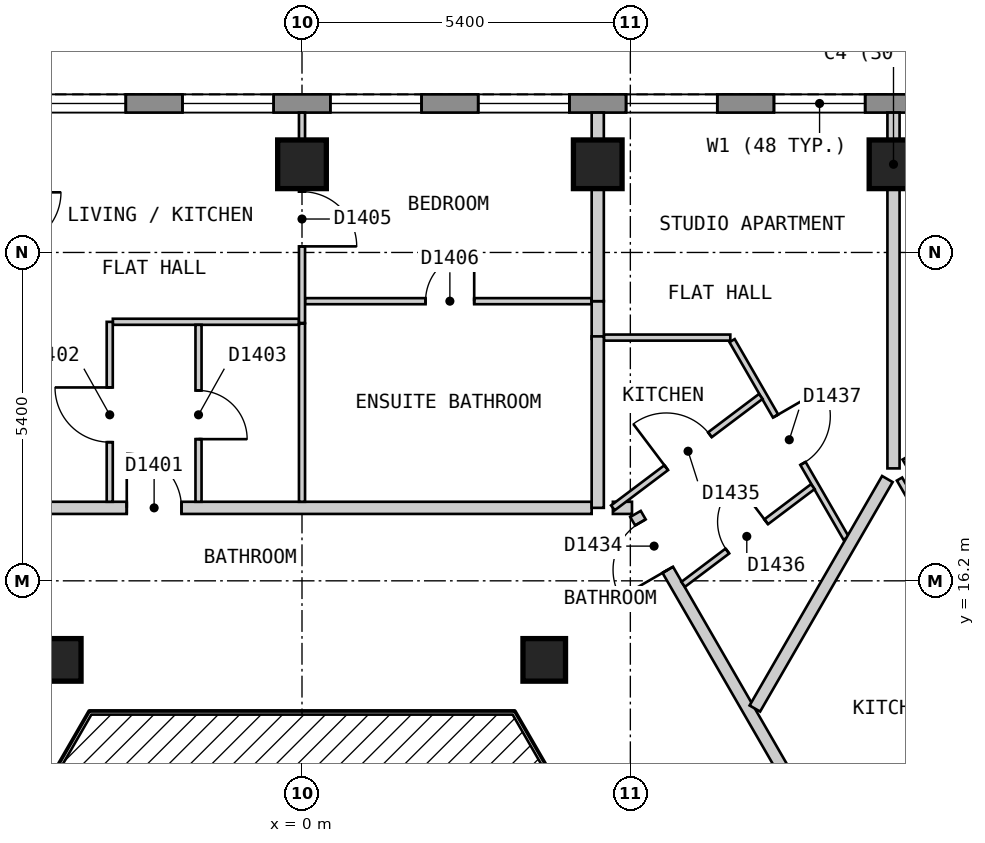
"""IFC4 building model, lengths in metres.
Left out: names, types, materials, properties, quantities, classifications, styles, units other than length and angle.
Written with IfcOpenShell. Run it as: python <this file> out.ifc"""

import sys

from ifc_helpers import new_model, si_unit, direction, frame, frame_2d, origin, origin_2d, place, context, subcontext, project, spatial, polyline, rectangle, outline, extrude, element, fill, save


model = new_model("IFC4")
c1 = context("Model", 3, precision=1e-05, world=origin(), true_north=direction((0.0, 1.0)))
c2 = subcontext(c1, "Body", "Model", "MODEL_VIEW")
j1 = project(units=[si_unit("LENGTHUNIT", "METRE"), si_unit("PLANEANGLEUNIT", "RADIAN")], contexts=[c1])
p1 = place(None, origin())
s1 = spatial("IfcSite", under=j1, at=p1, CompositionType="ELEMENT")
p2 = place(p1, origin())
s2 = spatial("IfcBuilding", under=s1, at=p2, CompositionType="ELEMENT")
p3 = place(p2, frame((0.0, 0.0, 166.2)))
s3 = spatial("IfcBuildingStorey", under=s2, at=p3, CompositionType="ELEMENT", Elevation=166.2)
for number, where, z_axis, x_axis in (
    (1, (9.728, 23.05, 0.0), (0.0, 0.0, 1.0), (-1.0, 0.0, 0.0)),
    (2, (4.864, 23.05, 0.0), (0.0, 0.0, 1.0), (-1.0, 0.0, 0.0)),
    (3, (0.0, 23.05, 0.0), (0.0, 0.0, 1.0), (-1.0, 0.0, 0.0)),
):
    element("IfcColumn", number, at=place(p3, frame(where, z_axis=z_axis, x_axis=x_axis)), inside=s3, PredefinedType="COLUMN", context=c2, shape_type="SweptSolid", body=[
        extrude(rectangle(XDim=0.8, YDim=0.8, at=origin_2d()), origin(), (0.0, 0.0, 1.0), 3.0),
    ])
for number, where, z_axis, x_axis in (
    (4, (3.984, 14.9, 0.0), (0.0, 0.0, 1.0), (1.0, 0.0, 0.0)),
    (5, (-3.984, 14.9, 0.0), (0.0, 0.0, 1.0), (1.0, 0.0, 0.0)),
):
    element("IfcColumn", number, at=place(p3, frame(where, z_axis=z_axis, x_axis=x_axis)), inside=s3, PredefinedType="COLUMN", context=c2, shape_type="SweptSolid", body=[
        extrude(rectangle(XDim=0.7, YDim=0.7, at=origin_2d()), origin(), (0.0, 0.0, 1.0), 3.0),
    ])
p4 = place(p3, frame((10.392, 24.05, 0.0), z_axis=(0.0, 0.0, 1.0), x_axis=(-1.0, 0.0, 0.0)))
e6 = element("IfcWall", 6, at=p4, inside=s3, PredefinedType="SOLIDWALL", context=c2, shape_type="SweptSolid", body=[
    extrude(outline(polyline([(0.0, -0.15), (20.784, -0.15), (20.704, 0.15), (0.08, 0.15), (0.0, -0.15)])), origin(), (0.0, 0.0, 1.0), 2.7),
])
p5 = place(p4, frame((1.13, 0.0, 0.15)))
e7 = element("IfcOpeningElement", 7, at=p5, cuts=e6, PredefinedType="OPENING", context=c2, shape_type="SweptSolid", body=[
    extrude(rectangle(XDim=1.5, YDim=2.1, at=frame_2d((0.75, 1.05))), frame((0.0, 0.16, 0.0), z_axis=(0.0, -1.0, 0.0), x_axis=(1.0, 0.0, 0.0)), (0.0, 0.0, 1.0), 0.32),
])
p6 = place(p4, frame((3.562, 0.0, 0.15)))
e8 = element("IfcOpeningElement", 8, at=p6, cuts=e6, PredefinedType="OPENING", context=c2, shape_type="SweptSolid", body=[
    extrude(rectangle(XDim=1.5, YDim=2.1, at=frame_2d((0.75, 1.05))), frame((0.0, 0.16, 0.0), z_axis=(0.0, -1.0, 0.0), x_axis=(1.0, 0.0, 0.0)), (0.0, 0.0, 1.0), 0.32),
])
p7 = place(p4, frame((5.994, 0.0, 0.15)))
e9 = element("IfcOpeningElement", 9, at=p7, cuts=e6, PredefinedType="OPENING", context=c2, shape_type="SweptSolid", body=[
    extrude(rectangle(XDim=1.5, YDim=2.1, at=frame_2d((0.75, 1.05))), frame((0.0, 0.16, 0.0), z_axis=(0.0, -1.0, 0.0), x_axis=(1.0, 0.0, 0.0)), (0.0, 0.0, 1.0), 0.32),
])
p8 = place(p4, frame((8.426, 0.0, 0.15)))
e10 = element("IfcOpeningElement", 10, at=p8, cuts=e6, PredefinedType="OPENING", context=c2, shape_type="SweptSolid", body=[
    extrude(rectangle(XDim=1.5, YDim=2.1, at=frame_2d((0.75, 1.05))), frame((0.0, 0.16, 0.0), z_axis=(0.0, -1.0, 0.0), x_axis=(1.0, 0.0, 0.0)), (0.0, 0.0, 1.0), 0.32),
])
p9 = place(p4, frame((10.858, 0.0, 0.15)))
e11 = element("IfcOpeningElement", 11, at=p9, cuts=e6, PredefinedType="OPENING", context=c2, shape_type="SweptSolid", body=[
    extrude(rectangle(XDim=1.5, YDim=2.1, at=frame_2d((0.75, 1.05))), frame((0.0, 0.16, 0.0), z_axis=(0.0, -1.0, 0.0), x_axis=(1.0, 0.0, 0.0)), (0.0, 0.0, 1.0), 0.32),
])
p10 = place(p4, frame((13.29, 0.0, 0.15)))
e12 = element("IfcOpeningElement", 12, at=p10, cuts=e6, PredefinedType="OPENING", context=c2, shape_type="SweptSolid", body=[
    extrude(rectangle(XDim=1.5, YDim=2.1, at=frame_2d((0.75, 1.05))), frame((0.0, 0.16, 0.0), z_axis=(0.0, -1.0, 0.0), x_axis=(1.0, 0.0, 0.0)), (0.0, 0.0, 1.0), 0.32),
])
p11 = place(p4, frame((15.722, 0.0, 0.15)))
e13 = element("IfcOpeningElement", 13, at=p11, cuts=e6, PredefinedType="OPENING", context=c2, shape_type="SweptSolid", body=[
    extrude(rectangle(XDim=1.5, YDim=2.1, at=frame_2d((0.75, 1.05))), frame((0.0, 0.16, 0.0), z_axis=(0.0, -1.0, 0.0), x_axis=(1.0, 0.0, 0.0)), (0.0, 0.0, 1.0), 0.32),
])
p12 = place(p4, frame((18.154, 0.0, 0.15)))
e14 = element("IfcOpeningElement", 14, at=p12, cuts=e6, PredefinedType="OPENING", context=c2, shape_type="SweptSolid", body=[
    extrude(rectangle(XDim=1.5, YDim=2.1, at=frame_2d((0.75, 1.05))), frame((0.0, 0.16, 0.0), z_axis=(0.0, -1.0, 0.0), x_axis=(1.0, 0.0, 0.0)), (0.0, 0.0, 1.0), 0.32),
])
p13 = place(p3, frame((5.485, 17.3, 0.0), z_axis=(0.0, 0.0, 1.0), x_axis=(0.499965832213, -0.866045129667, 0.0)))
e15 = element("IfcWall", 15, at=p13, inside=s3, PredefinedType="PARTITIONING", context=c2, shape_type="SweptSolid", body=[
    extrude(rectangle(XDim=10.739, YDim=0.2, at=frame_2d((5.369, 0.0))), origin(), (0.0, 0.0, 1.0), 2.7),
])
p14 = place(p13, frame((9.048, 0.0, 0.0)))
e16 = element("IfcOpeningElement", 16, at=p14, cuts=e15, PredefinedType="OPENING", context=c2, shape_type="SweptSolid", body=[
    extrude(rectangle(XDim=1.0, YDim=2.1, at=frame_2d((0.5, 1.05))), frame((0.0, 0.11, 0.0), z_axis=(0.0, -1.0, 0.0), x_axis=(1.0, 0.0, 0.0)), (0.0, 0.0, 1.0), 0.22),
])
p15 = place(p13, frame((0.161, 0.0, 0.0)))
e17 = element("IfcOpeningElement", 17, at=p15, cuts=e15, PredefinedType="OPENING", context=c2, shape_type="SweptSolid", body=[
    extrude(rectangle(XDim=0.9, YDim=2.1, at=frame_2d((0.45, 1.05))), frame((0.0, 0.11, 0.0), z_axis=(0.0, -1.0, 0.0), x_axis=(1.0, 0.0, 0.0)), (0.0, 0.0, 1.0), 0.22),
])
p16 = place(p3, frame((-5.311, 17.4, 0.0), z_axis=(0.0, 0.0, 1.0), x_axis=(1.0, 0.0, 0.0)))
e18 = element("IfcWall", 18, at=p16, inside=s3, PredefinedType="PARTITIONING", context=c2, shape_type="SweptSolid", body=[
    extrude(rectangle(XDim=10.075, YDim=0.2, at=frame_2d((5.038, 0.0))), origin(), (0.0, 0.0, 1.0), 2.7),
])
p17 = place(p16, frame((2.429, 0.0, 0.0)))
e19 = element("IfcOpeningElement", 19, at=p17, cuts=e18, PredefinedType="OPENING", context=c2, shape_type="SweptSolid", body=[
    extrude(rectangle(XDim=0.9, YDim=2.1, at=frame_2d((0.45, 1.05))), frame((0.0, 0.11, 0.0), z_axis=(0.0, -1.0, 0.0), x_axis=(1.0, 0.0, 0.0)), (0.0, 0.0, 1.0), 0.22),
])
p18 = place(p3, frame((5.113, 17.4, 0.0), z_axis=(0.0, 0.0, 1.0), x_axis=(1.0, 0.0, 0.0)))
e20 = element("IfcWall", 20, at=p18, inside=s3, PredefinedType="PARTITIONING", context=c2, shape_type="SweptSolid", body=[
    extrude(rectangle(XDim=0.314, YDim=0.2, at=frame_2d((0.157, 0.0))), origin(), (0.0, 0.0, 1.0), 2.7),
])
p19 = place(p3, frame((7.073, 20.15, 0.0), z_axis=(0.0, 0.0, 1.0), x_axis=(0.499917691695, -0.866072919292, 0.0)))
e21 = element("IfcWall", 21, at=p19, inside=s3, PredefinedType="PARTITIONING", context=c2, shape_type="SweptSolid", body=[
    extrude(rectangle(XDim=3.753, YDim=0.1, at=frame_2d((1.876, 0.0))), origin(), (0.0, 0.0, 1.0), 2.7),
])
p20 = place(p19, frame((1.432, 0.0, 0.0)))
e22 = element("IfcOpeningElement", 22, at=p20, cuts=e21, PredefinedType="OPENING", context=c2, shape_type="SweptSolid", body=[
    extrude(rectangle(XDim=0.9, YDim=2.1, at=frame_2d((0.45, 1.05))), frame((0.0, 0.06, 0.0), z_axis=(0.0, -1.0, 0.0), x_axis=(1.0, 0.0, 0.0)), (0.0, 0.0, 1.0), 0.12),
])
p21 = place(p3, frame((9.827, 17.874, 0.0), z_axis=(0.0, 0.0, 1.0), x_axis=(0.499962189394, -0.866047232647, 0.0)))
e23 = element("IfcWall", 23, at=p21, inside=s3, PredefinedType="PARTITIONING", context=c2, shape_type="SweptSolid", body=[
    extrude(rectangle(XDim=11.401, YDim=0.1, at=frame_2d((5.701, 0.0))), origin(), (0.0, 0.0, 1.0), 2.7),
])
p22 = place(p21, frame((7.433, 0.0, 0.0)))
e24 = element("IfcOpeningElement", 24, at=p22, cuts=e23, PredefinedType="OPENING", context=c2, shape_type="SweptSolid", body=[
    extrude(rectangle(XDim=0.9, YDim=2.1, at=frame_2d((0.45, 1.05))), frame((0.0, 0.06, 0.0), z_axis=(0.0, -1.0, 0.0), x_axis=(1.0, 0.0, 0.0)), (0.0, 0.0, 1.0), 0.12),
])
p23 = place(p3, frame((0.0, 20.43, 0.0), z_axis=(0.0, 0.0, 1.0), x_axis=(0.0, -1.0, 0.0)))
e25 = element("IfcWall", 25, at=p23, inside=s3, PredefinedType="PARTITIONING", context=c2, shape_type="SweptSolid", body=[
    extrude(rectangle(XDim=2.93, YDim=0.1, at=frame_2d((1.465, 0.0))), origin(), (0.0, 0.0, 1.0), 2.7),
])
p24 = place(p3, frame((4.964, 20.2, 0.0), z_axis=(0.0, 0.0, 1.0), x_axis=(1.0, 0.0, 0.0)))
e26 = element("IfcWall", 26, at=p24, inside=s3, PredefinedType="PARTITIONING", context=c2, shape_type="SweptSolid", body=[
    extrude(rectangle(XDim=2.08, YDim=0.1, at=frame_2d((1.04, 0.0))), origin(), (0.0, 0.0, 1.0), 2.7),
])
p25 = place(p3, frame((-3.111, 20.46, 0.0), z_axis=(0.0, 0.0, 1.0), x_axis=(1.0, 0.0, 0.0)))
e27 = element("IfcWall", 27, at=p25, inside=s3, PredefinedType="PARTITIONING", context=c2, shape_type="SweptSolid", body=[
    extrude(rectangle(XDim=3.061, YDim=0.1, at=frame_2d((1.531, 0.0))), origin(), (0.0, 0.0, 1.0), 2.7),
])
p26 = place(p3, frame((0.05, 20.799, 0.0), z_axis=(0.0, 0.0, 1.0), x_axis=(1.0, 0.0, 0.0)))
e28 = element("IfcWall", 28, at=p26, inside=s3, PredefinedType="PARTITIONING", context=c2, shape_type="SweptSolid", body=[
    extrude(rectangle(XDim=4.714, YDim=0.1, at=frame_2d((2.357, 0.0))), origin(), (0.0, 0.0, 1.0), 2.7),
])
p27 = place(p26, frame((1.982, 0.0, 0.0)))
e29 = element("IfcOpeningElement", 29, at=p27, cuts=e28, PredefinedType="OPENING", context=c2, shape_type="SweptSolid", body=[
    extrude(rectangle(XDim=0.8, YDim=2.1, at=frame_2d((0.4, 1.05))), frame((0.0, 0.06, 0.0), z_axis=(0.0, -1.0, 0.0), x_axis=(1.0, 0.0, 0.0)), (0.0, 0.0, 1.0), 0.12),
])
p28 = place(p3, frame((0.0, 20.44, 0.0), z_axis=(0.0, 0.0, 1.0), x_axis=(0.0, 1.0, 0.0)))
e30 = element("IfcWall", 30, at=p28, inside=s3, PredefinedType="PARTITIONING", context=c2, shape_type="SweptSolid", body=[
    extrude(rectangle(XDim=3.46, YDim=0.1, at=frame_2d((1.73, 0.0))), origin(), (0.0, 0.0, 1.0), 2.7),
])
p29 = place(p28, frame((1.26, 0.0, 0.0)))
e31 = element("IfcOpeningElement", 31, at=p29, cuts=e30, PredefinedType="OPENING", context=c2, shape_type="SweptSolid", body=[
    extrude(rectangle(XDim=0.9, YDim=2.1, at=frame_2d((0.45, 1.05))), frame((0.0, 0.06, 0.0), z_axis=(0.0, -1.0, 0.0), x_axis=(1.0, 0.0, 0.0)), (0.0, 0.0, 1.0), 0.12),
])
p30 = place(p3, frame((-3.162, 17.5, 0.0), z_axis=(0.0, 0.0, 1.0), x_axis=(0.0, 1.0, 0.0)))
e32 = element("IfcWall", 32, at=p30, inside=s3, PredefinedType="PARTITIONING", context=c2, shape_type="SweptSolid", body=[
    extrude(rectangle(XDim=2.959, YDim=0.1, at=frame_2d((1.479, 0.0))), origin(), (0.0, 0.0, 1.0), 2.7),
])
p31 = place(p30, frame((0.98, 0.0, 0.0)))
e33 = element("IfcOpeningElement", 33, at=p31, cuts=e32, PredefinedType="OPENING", context=c2, shape_type="SweptSolid", body=[
    extrude(rectangle(XDim=0.9, YDim=2.1, at=frame_2d((0.45, 1.05))), frame((0.0, 0.06, 0.0), z_axis=(0.0, -1.0, 0.0), x_axis=(1.0, 0.0, 0.0)), (0.0, 0.0, 1.0), 0.12),
])
p32 = place(p3, frame((-1.702, 17.5, 0.0), z_axis=(0.0, 0.0, 1.0), x_axis=(0.0, 1.0, 0.0)))
e34 = element("IfcWall", 34, at=p32, inside=s3, PredefinedType="PARTITIONING", context=c2, shape_type="SweptSolid", body=[
    extrude(rectangle(XDim=2.91, YDim=0.1, at=frame_2d((1.455, 0.0))), origin(), (0.0, 0.0, 1.0), 2.7),
])
p33 = place(p32, frame((1.03, 0.0, 0.0)))
e35 = element("IfcOpeningElement", 35, at=p33, cuts=e34, PredefinedType="OPENING", context=c2, shape_type="SweptSolid", body=[
    extrude(rectangle(XDim=0.8, YDim=2.1, at=frame_2d((0.4, 1.05))), frame((0.0, 0.06, 0.0), z_axis=(0.0, -1.0, 0.0), x_axis=(1.0, 0.0, 0.0)), (0.0, 0.0, 1.0), 0.12),
])
p34 = place(p3, frame((8.999, 11.413, 0.0), z_axis=(0.0, 0.0, 1.0), x_axis=(0.865969252911, 0.500097243556, 0.0)))
e36 = element("IfcWall", 36, at=p34, inside=s3, PredefinedType="PARTITIONING", context=c2, shape_type="SweptSolid", body=[
    extrude(rectangle(XDim=3.947, YDim=0.1, at=frame_2d((1.974, 0.0))), origin(), (0.0, 0.0, 1.0), 2.7),
])
p35 = place(p34, frame((1.474, 0.0, 0.0)))
e37 = element("IfcOpeningElement", 37, at=p35, cuts=e36, PredefinedType="OPENING", context=c2, shape_type="SweptSolid", body=[
    extrude(rectangle(XDim=0.9, YDim=2.1, at=frame_2d((0.45, 1.05))), frame((0.0, 0.06, 0.0), z_axis=(0.0, -1.0, 0.0), x_axis=(1.0, 0.0, 0.0)), (0.0, 0.0, 1.0), 0.12),
])
p36 = place(p3, frame((9.902, 18.151, 0.0), z_axis=(0.0, 0.0, 1.0), x_axis=(0.866032278734, 0.499988092049, 0.0)))
e38 = element("IfcWall", 38, at=p36, inside=s3, PredefinedType="PARTITIONING", context=c2, shape_type="SweptSolid", body=[
    extrude(rectangle(XDim=5.649, YDim=0.1, at=frame_2d((2.824, 0.0))), origin(), (0.0, 0.0, 1.0), 2.7),
])
p37 = place(p36, frame((2.274, 0.0, 0.0)))
e39 = element("IfcOpeningElement", 39, at=p37, cuts=e38, PredefinedType="OPENING", context=c2, shape_type="SweptSolid", body=[
    extrude(rectangle(XDim=0.9, YDim=2.1, at=frame_2d((0.45, 1.05))), frame((0.0, 0.06, 0.0), z_axis=(0.0, -1.0, 0.0), x_axis=(1.0, 0.0, 0.0)), (0.0, 0.0, 1.0), 0.12),
])
p38 = place(p3, frame((6.269, 16.142, 0.0), z_axis=(0.0, 0.0, 1.0), x_axis=(0.798549086509, 0.601929693931, 0.0)))
e40 = element("IfcWall", 40, at=p38, inside=s3, PredefinedType="PARTITIONING", context=c2, shape_type="SweptSolid", body=[
    extrude(rectangle(XDim=2.67, YDim=0.1, at=frame_2d((1.335, 0.0))), origin(), (0.0, 0.0, 1.0), 2.7),
])
p39 = place(p38, frame((0.91, 0.0, 0.0)))
e41 = element("IfcOpeningElement", 41, at=p39, cuts=e40, PredefinedType="OPENING", context=c2, shape_type="SweptSolid", body=[
    extrude(rectangle(XDim=0.8, YDim=2.1, at=frame_2d((0.4, 1.05))), frame((0.0, 0.06, 0.0), z_axis=(0.0, -1.0, 0.0), x_axis=(1.0, 0.0, 0.0)), (0.0, 0.0, 1.0), 0.12),
])
p40 = place(p3, frame((5.113, 17.4, 0.0), z_axis=(0.0, 0.0, 1.0), x_axis=(0.798718434647, 0.601704962714, 0.0)))
e42 = element("IfcWall", 42, at=p40, inside=s3, PredefinedType="PARTITIONING", context=c2, shape_type="SweptSolid", body=[
    extrude(rectangle(XDim=3.045, YDim=0.1, at=frame_2d((1.522, 0.0))), origin(), (0.0, 0.0, 1.0), 2.7),
])
p41 = place(p40, frame((1.098, 0.0, 0.0)))
e43 = element("IfcOpeningElement", 43, at=p41, cuts=e42, PredefinedType="OPENING", context=c2, shape_type="SweptSolid", body=[
    extrude(rectangle(XDim=0.9, YDim=2.1, at=frame_2d((0.45, 1.05))), frame((0.0, 0.06, 0.0), z_axis=(0.0, -1.0, 0.0), x_axis=(1.0, 0.0, 0.0)), (0.0, 0.0, 1.0), 0.12),
])
p42 = place(p3, frame((4.864, 20.799, 0.0), z_axis=(0.0, 0.0, 1.0), x_axis=(0.0, -1.0, 0.0)))
e44 = element("IfcWall", 44, at=p42, inside=s3, PredefinedType="PARTITIONING", context=c2, shape_type="SweptSolid", body=[
    extrude(rectangle(XDim=0.619, YDim=0.2, at=frame_2d((0.31, 0.0))), origin(), (0.0, 0.0, 1.0), 2.7),
])
p43 = place(p3, frame((7.448, 14.1, 0.0), z_axis=(0.0, 0.0, 1.0), x_axis=(0.500013426303, 0.866017651966, 0.0)))
e45 = element("IfcWall", 45, at=p43, inside=s3, PredefinedType="PARTITIONING", context=c2, shape_type="SweptSolid", body=[
    extrude(rectangle(XDim=4.358, YDim=0.2, at=frame_2d((2.179, 0.0))), origin(), (0.0, 0.0, 1.0), 2.7),
])
p44 = place(p3, frame((4.864, 17.4, 0.0), z_axis=(0.0, 0.0, 1.0), x_axis=(0.0, 1.0, 0.0)))
e46 = element("IfcWall", 46, at=p44, inside=s3, PredefinedType="PARTITIONING", context=c2, shape_type="SweptSolid", body=[
    extrude(rectangle(XDim=2.82, YDim=0.2, at=frame_2d((1.41, 0.0))), origin(), (0.0, 0.0, 1.0), 2.7),
])
p45 = place(p3, frame((4.864, 20.799, 0.0), z_axis=(0.0, 0.0, 1.0), x_axis=(0.0, 1.0, 0.0)))
e47 = element("IfcWall", 47, at=p45, inside=s3, PredefinedType="PARTITIONING", context=c2, shape_type="SweptSolid", body=[
    extrude(rectangle(XDim=3.101, YDim=0.2, at=frame_2d((1.55, 0.0))), origin(), (0.0, 0.0, 1.0), 2.7),
])
p46 = place(p3, frame((9.728, 18.049, 0.0), z_axis=(0.0, 0.0, 1.0), x_axis=(0.0, 1.0, 0.0)))
e48 = element("IfcWall", 48, at=p46, inside=s3, PredefinedType="PARTITIONING", context=c2, shape_type="SweptSolid", body=[
    extrude(rectangle(XDim=5.851, YDim=0.2, at=frame_2d((2.925, 0.0))), origin(), (0.0, 0.0, 1.0), 2.7),
])
p47 = place(p5, origin())
e49 = element("IfcWindow", 49, at=p47, inside=s3, PartitioningType="SINGLE_PANEL", PredefinedType="WINDOW", context=c2, shape_type="SweptSolid", body=[
    extrude(rectangle(XDim=1.5, YDim=2.1, at=frame_2d((0.75, 1.05))), frame((0.0, 0.03, 0.0), z_axis=(0.0, -1.0, 0.0), x_axis=(1.0, 0.0, 0.0)), (0.0, 0.0, 1.0), 0.06),
])
fill(e7, e49)
p48 = place(p6, origin())
e50 = element("IfcWindow", 50, at=p48, inside=s3, PartitioningType="SINGLE_PANEL", PredefinedType="WINDOW", context=c2, shape_type="SweptSolid", body=[
    extrude(rectangle(XDim=1.5, YDim=2.1, at=frame_2d((0.75, 1.05))), frame((0.0, 0.03, 0.0), z_axis=(0.0, -1.0, 0.0), x_axis=(1.0, 0.0, 0.0)), (0.0, 0.0, 1.0), 0.06),
])
fill(e8, e50)
p49 = place(p7, origin())
e51 = element("IfcWindow", 51, at=p49, inside=s3, PartitioningType="SINGLE_PANEL", PredefinedType="WINDOW", context=c2, shape_type="SweptSolid", body=[
    extrude(rectangle(XDim=1.5, YDim=2.1, at=frame_2d((0.75, 1.05))), frame((0.0, 0.03, 0.0), z_axis=(0.0, -1.0, 0.0), x_axis=(1.0, 0.0, 0.0)), (0.0, 0.0, 1.0), 0.06),
])
fill(e9, e51)
p50 = place(p8, origin())
e52 = element("IfcWindow", 52, at=p50, inside=s3, PartitioningType="SINGLE_PANEL", PredefinedType="WINDOW", context=c2, shape_type="SweptSolid", body=[
    extrude(rectangle(XDim=1.5, YDim=2.1, at=frame_2d((0.75, 1.05))), frame((0.0, 0.03, 0.0), z_axis=(0.0, -1.0, 0.0), x_axis=(1.0, 0.0, 0.0)), (0.0, 0.0, 1.0), 0.06),
])
fill(e10, e52)
p51 = place(p9, origin())
e53 = element("IfcWindow", 53, at=p51, inside=s3, PartitioningType="SINGLE_PANEL", PredefinedType="WINDOW", context=c2, shape_type="SweptSolid", body=[
    extrude(rectangle(XDim=1.5, YDim=2.1, at=frame_2d((0.75, 1.05))), frame((0.0, 0.03, 0.0), z_axis=(0.0, -1.0, 0.0), x_axis=(1.0, 0.0, 0.0)), (0.0, 0.0, 1.0), 0.06),
])
fill(e11, e53)
p52 = place(p10, origin())
e54 = element("IfcWindow", 54, at=p52, inside=s3, PartitioningType="SINGLE_PANEL", PredefinedType="WINDOW", context=c2, shape_type="SweptSolid", body=[
    extrude(rectangle(XDim=1.5, YDim=2.1, at=frame_2d((0.75, 1.05))), frame((0.0, 0.03, 0.0), z_axis=(0.0, -1.0, 0.0), x_axis=(1.0, 0.0, 0.0)), (0.0, 0.0, 1.0), 0.06),
])
fill(e12, e54)
p53 = place(p17, origin())
e55 = element("IfcDoor", 55, at=p53, inside=s3, OperationType="SINGLE_SWING_LEFT", PredefinedType="DOOR", context=c2, shape_type="SweptSolid", body=[
    extrude(rectangle(XDim=0.9, YDim=2.1, at=frame_2d((0.45, 1.05))), frame((0.0, 0.025, 0.0), z_axis=(0.0, -1.0, 0.0), x_axis=(1.0, 0.0, 0.0)), (0.0, 0.0, 1.0), 0.05),
])
fill(e19, e55)
p54 = place(p31, origin())
e56 = element("IfcDoor", 56, at=p54, inside=s3, OperationType="SINGLE_SWING_RIGHT", PredefinedType="DOOR", context=c2, shape_type="SweptSolid", body=[
    extrude(rectangle(XDim=0.9, YDim=2.1, at=frame_2d((0.45, 1.05))), frame((0.0, 0.025, 0.0), z_axis=(0.0, -1.0, 0.0), x_axis=(1.0, 0.0, 0.0)), (0.0, 0.0, 1.0), 0.05),
])
fill(e33, e56)
p55 = place(p33, origin())
e57 = element("IfcDoor", 57, at=p55, inside=s3, OperationType="SINGLE_SWING_LEFT", PredefinedType="DOOR", context=c2, shape_type="SweptSolid", body=[
    extrude(rectangle(XDim=0.8, YDim=2.1, at=frame_2d((0.4, 1.05))), frame((0.0, 0.025, 0.0), z_axis=(0.0, -1.0, 0.0), x_axis=(1.0, 0.0, 0.0)), (0.0, 0.0, 1.0), 0.05),
])
fill(e35, e57)
p56 = place(p29, origin())
e58 = element("IfcDoor", 58, at=p56, inside=s3, OperationType="SINGLE_SWING_LEFT", PredefinedType="DOOR", context=c2, shape_type="SweptSolid", body=[
    extrude(rectangle(XDim=0.9, YDim=2.1, at=frame_2d((0.45, 1.05))), frame((0.0, 0.025, 0.0), z_axis=(0.0, -1.0, 0.0), x_axis=(1.0, 0.0, 0.0)), (0.0, 0.0, 1.0), 0.05),
])
fill(e31, e58)
p57 = place(p27, origin())
e59 = element("IfcDoor", 59, at=p57, inside=s3, OperationType="SINGLE_SWING_RIGHT", PredefinedType="DOOR", context=c2, shape_type="SweptSolid", body=[
    extrude(rectangle(XDim=0.8, YDim=2.1, at=frame_2d((0.4, 1.05))), frame((0.0, 0.025, 0.0), z_axis=(0.0, -1.0, 0.0), x_axis=(1.0, 0.0, 0.0)), (0.0, 0.0, 1.0), 0.05),
])
fill(e29, e59)
p58 = place(p15, origin())
e60 = element("IfcDoor", 60, at=p58, inside=s3, OperationType="SINGLE_SWING_RIGHT", PredefinedType="DOOR", context=c2, shape_type="SweptSolid", body=[
    extrude(rectangle(XDim=0.9, YDim=2.1, at=frame_2d((0.45, 1.05))), frame((0.0, 0.025, 0.0), z_axis=(0.0, -1.0, 0.0), x_axis=(1.0, 0.0, 0.0)), (0.0, 0.0, 1.0), 0.05),
])
fill(e17, e60)
p59 = place(p41, origin())
e61 = element("IfcDoor", 61, at=p59, inside=s3, OperationType="SINGLE_SWING_LEFT", PredefinedType="DOOR", context=c2, shape_type="SweptSolid", body=[
    extrude(rectangle(XDim=0.9, YDim=2.1, at=frame_2d((0.45, 1.05))), frame((0.0, 0.025, 0.0), z_axis=(0.0, -1.0, 0.0), x_axis=(1.0, 0.0, 0.0)), (0.0, 0.0, 1.0), 0.05),
])
fill(e43, e61)
p60 = place(p39, origin())
e62 = element("IfcDoor", 62, at=p60, inside=s3, OperationType="SINGLE_SWING_RIGHT", PredefinedType="DOOR", context=c2, shape_type="SweptSolid", body=[
    extrude(rectangle(XDim=0.8, YDim=2.1, at=frame_2d((0.4, 1.05))), frame((0.0, 0.025, 0.0), z_axis=(0.0, -1.0, 0.0), x_axis=(1.0, 0.0, 0.0)), (0.0, 0.0, 1.0), 0.05),
])
fill(e41, e62)
p61 = place(p20, origin())
e63 = element("IfcDoor", 63, at=p61, inside=s3, OperationType="SINGLE_SWING_LEFT", PredefinedType="DOOR", context=c2, shape_type="SweptSolid", body=[
    extrude(rectangle(XDim=0.9, YDim=2.1, at=frame_2d((0.45, 1.05))), frame((0.0, 0.025, 0.0), z_axis=(0.0, -1.0, 0.0), x_axis=(1.0, 0.0, 0.0)), (0.0, 0.0, 1.0), 0.05),
])
fill(e22, e63)
save(model, sys.argv[1])
